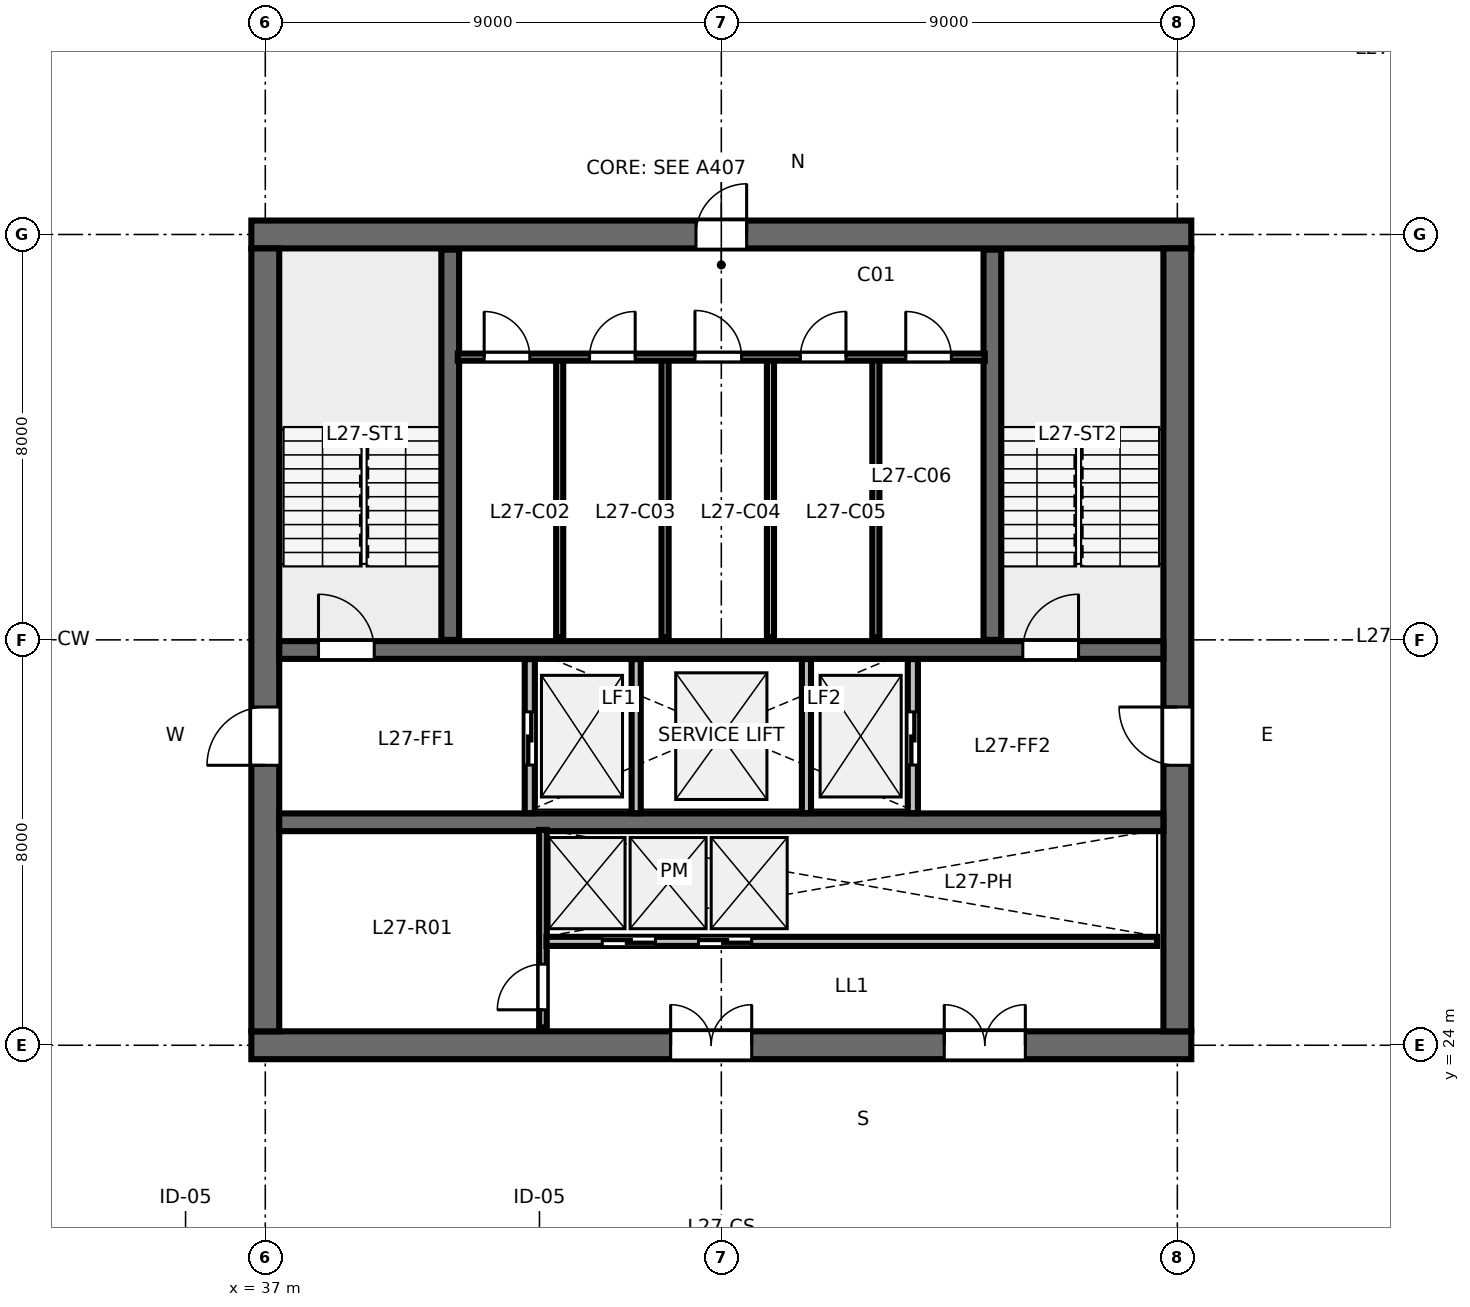
"""IFC4 building model, lengths in metres.
Left out: names, types, materials, properties, quantities, classifications, styles, units other than length and angle.
Written with IfcOpenShell. Run it as: python <this file> out.ifc"""

import sys

from ifc_helpers import new_model, si_unit, direction, frame, frame_2d, origin, place, context, subcontext, project, spatial, rectangle, extrude, element, fill, save


model = new_model("IFC4")
c1 = context("Model", 3, precision=1e-05, world=origin(), true_north=direction((0.0, 1.0)))
c2 = subcontext(c1, "Body", "Model", "MODEL_VIEW")
j1 = project(units=[si_unit("LENGTHUNIT", "METRE"), si_unit("PLANEANGLEUNIT", "RADIAN")], contexts=[c1])
p1 = place(None, origin())
s1 = spatial("IfcSite", under=j1, at=p1, CompositionType="ELEMENT")
p2 = place(p1, origin())
s2 = spatial("IfcBuilding", under=s1, at=p2, CompositionType="ELEMENT")
p3 = place(p2, frame((0.0, 0.0, 106.0)))
s3 = spatial("IfcBuildingStorey", under=s2, at=p3, CompositionType="ELEMENT", Elevation=106.0)
p4 = place(p3, frame((36.725, 24.0, 0.0), z_axis=(0.0, 0.0, 1.0), x_axis=(1.0, 0.0, 0.0)))
e1 = element("IfcWall", 1, at=p4, inside=s3, PredefinedType="SHEAR", context=c2, shape_type="SweptSolid", body=[
    extrude(rectangle(XDim=18.55, YDim=0.55, at=frame_2d((9.275, 0.0))), origin(), (0.0, 0.0, 1.0), 3.36),
])
p5 = place(p4, frame((8.275, 0.0, 0.0)))
e2 = element("IfcOpeningElement", 2, at=p5, cuts=e1, PredefinedType="OPENING", context=c2, shape_type="SweptSolid", body=[
    extrude(rectangle(XDim=1.6, YDim=2.15, at=frame_2d((0.8, 1.075))), frame((0.0, 0.285, 0.0), z_axis=(0.0, -1.0, 0.0), x_axis=(1.0, 0.0, 0.0)), (0.0, 0.0, 1.0), 0.57),
])
p6 = place(p4, frame((13.675, 0.0, 0.0)))
e3 = element("IfcOpeningElement", 3, at=p6, cuts=e1, PredefinedType="OPENING", context=c2, shape_type="SweptSolid", body=[
    extrude(rectangle(XDim=1.6, YDim=2.15, at=frame_2d((0.8, 1.075))), frame((0.0, 0.285, 0.0), z_axis=(0.0, -1.0, 0.0), x_axis=(1.0, 0.0, 0.0)), (0.0, 0.0, 1.0), 0.57),
])
p7 = place(p3, frame((36.725, 40.0, 0.0), z_axis=(0.0, 0.0, 1.0), x_axis=(1.0, 0.0, 0.0)))
e4 = element("IfcWall", 4, at=p7, inside=s3, PredefinedType="SHEAR", context=c2, shape_type="SweptSolid", body=[
    extrude(rectangle(XDim=18.55, YDim=0.55, at=frame_2d((9.275, 0.0))), origin(), (0.0, 0.0, 1.0), 3.36),
])
p8 = place(p7, frame((8.775, 0.0, 0.0)))
e5 = element("IfcOpeningElement", 5, at=p8, cuts=e4, PredefinedType="OPENING", context=c2, shape_type="SweptSolid", body=[
    extrude(rectangle(XDim=1.0, YDim=2.15, at=frame_2d((0.5, 1.075))), frame((0.0, 0.285, 0.0), z_axis=(0.0, -1.0, 0.0), x_axis=(1.0, 0.0, 0.0)), (0.0, 0.0, 1.0), 0.57),
])
p9 = place(p3, frame((37.0, 24.275, 0.0), z_axis=(0.0, 0.0, 1.0), x_axis=(0.0, 1.0, 0.0)))
e6 = element("IfcWall", 6, at=p9, inside=s3, PredefinedType="SHEAR", context=c2, shape_type="SweptSolid", body=[
    extrude(rectangle(XDim=15.45, YDim=0.55, at=frame_2d((7.725, 0.0))), origin(), (0.0, 0.0, 1.0), 3.36),
])
p10 = place(p9, frame((5.25, 0.0, 0.0)))
e7 = element("IfcOpeningElement", 7, at=p10, cuts=e6, PredefinedType="OPENING", context=c2, shape_type="SweptSolid", body=[
    extrude(rectangle(XDim=1.15, YDim=2.15, at=frame_2d((0.575, 1.075))), frame((0.0, 0.285, 0.0), z_axis=(0.0, -1.0, 0.0), x_axis=(1.0, 0.0, 0.0)), (0.0, 0.0, 1.0), 0.57),
])
p11 = place(p3, frame((55.0, 24.275, 0.0), z_axis=(0.0, 0.0, 1.0), x_axis=(0.0, 1.0, 0.0)))
e8 = element("IfcWall", 8, at=p11, inside=s3, PredefinedType="SHEAR", context=c2, shape_type="SweptSolid", body=[
    extrude(rectangle(XDim=15.45, YDim=0.55, at=frame_2d((7.725, 0.0))), origin(), (0.0, 0.0, 1.0), 3.36),
])
p12 = place(p11, frame((5.25, 0.0, 0.0)))
e9 = element("IfcOpeningElement", 9, at=p12, cuts=e8, PredefinedType="OPENING", context=c2, shape_type="SweptSolid", body=[
    extrude(rectangle(XDim=1.15, YDim=2.15, at=frame_2d((0.575, 1.075))), frame((0.0, 0.285, 0.0), z_axis=(0.0, -1.0, 0.0), x_axis=(1.0, 0.0, 0.0)), (0.0, 0.0, 1.0), 0.57),
])
p13 = place(p3, frame((37.275, 31.8, 0.0), z_axis=(0.0, 0.0, 1.0), x_axis=(1.0, 0.0, 0.0)))
e10 = element("IfcWall", 10, at=p13, inside=s3, PredefinedType="SHEAR", context=c2, shape_type="SweptSolid", body=[
    extrude(rectangle(XDim=17.45, YDim=0.35, at=frame_2d((8.725, 0.0))), origin(), (0.0, 0.0, 1.0), 3.36),
])
p14 = place(p13, frame((0.775, 0.0, 0.0)))
e11 = element("IfcOpeningElement", 11, at=p14, cuts=e10, PredefinedType="OPENING", context=c2, shape_type="SweptSolid", body=[
    extrude(rectangle(XDim=1.1, YDim=2.15, at=frame_2d((0.55, 1.075))), frame((0.0, 0.185, 0.0), z_axis=(0.0, -1.0, 0.0), x_axis=(1.0, 0.0, 0.0)), (0.0, 0.0, 1.0), 0.37),
])
p15 = place(p13, frame((14.675, 0.0, 0.0)))
e12 = element("IfcOpeningElement", 12, at=p15, cuts=e10, PredefinedType="OPENING", context=c2, shape_type="SweptSolid", body=[
    extrude(rectangle(XDim=1.1, YDim=2.15, at=frame_2d((0.55, 1.075))), frame((0.0, 0.185, 0.0), z_axis=(0.0, -1.0, 0.0), x_axis=(1.0, 0.0, 0.0)), (0.0, 0.0, 1.0), 0.37),
])
p16 = place(p3, frame((37.275, 28.4, 0.0), z_axis=(0.0, 0.0, 1.0), x_axis=(1.0, 0.0, 0.0)))
e13 = element("IfcWall", 13, at=p16, inside=s3, PredefinedType="SHEAR", context=c2, shape_type="SweptSolid", body=[
    extrude(rectangle(XDim=17.45, YDim=0.35, at=frame_2d((8.725, 0.0))), origin(), (0.0, 0.0, 1.0), 3.36),
])
for number, where, z_axis, x_axis in (
    (14, (40.65, 32.0, 0.0), (0.0, 0.0, 1.0), (0.0, 1.0, 0.0)),
    (15, (51.35, 32.0, 0.0), (0.0, 0.0, 1.0), (0.0, 1.0, 0.0)),
):
    element("IfcWall", number, at=place(p3, frame(where, z_axis=z_axis, x_axis=x_axis)), inside=s3, PredefinedType="SHEAR", context=c2, shape_type="SweptSolid", body=[
        extrude(rectangle(XDim=7.7, YDim=0.35, at=frame_2d((3.85, 0.0))), origin(), (0.0, 0.0, 1.0), 3.6),
    ])
for number, where, z_axis, x_axis in (
    (16, (42.81, 32.05, 0.0), (0.0, 0.0, 1.0), (0.0, 1.0, 0.0)),
    (17, (44.89, 32.05, 0.0), (0.0, 0.0, 1.0), (0.0, 1.0, 0.0)),
    (18, (46.97, 32.05, 0.0), (0.0, 0.0, 1.0), (0.0, 1.0, 0.0)),
    (19, (49.05, 32.05, 0.0), (0.0, 0.0, 1.0), (0.0, 1.0, 0.0)),
):
    element("IfcWall", number, at=place(p3, frame(where, z_axis=z_axis, x_axis=x_axis)), inside=s3, PredefinedType="PARTITIONING", context=c2, shape_type="SweptSolid", body=[
        extrude(rectangle(XDim=5.5, YDim=0.14, at=frame_2d((2.75, 0.0))), origin(), (0.0, 0.0, 1.0), 3.36),
    ])
p17 = place(p3, frame((40.8, 37.58, 0.0), z_axis=(0.0, 0.0, 1.0), x_axis=(1.0, 0.0, 0.0)))
e20 = element("IfcWall", 20, at=p17, inside=s3, PredefinedType="PARTITIONING", context=c2, shape_type="SweptSolid", body=[
    extrude(rectangle(XDim=10.4, YDim=0.14, at=frame_2d((5.2, 0.0))), origin(), (0.0, 0.0, 1.0), 3.36),
])
p18 = place(p17, frame((0.52, 0.0, 0.0)))
e21 = element("IfcOpeningElement", 21, at=p18, cuts=e20, PredefinedType="OPENING", context=c2, shape_type="SweptSolid", body=[
    extrude(rectangle(XDim=0.9, YDim=2.15, at=frame_2d((0.45, 1.075))), frame((0.0, 0.08, 0.0), z_axis=(0.0, -1.0, 0.0), x_axis=(1.0, 0.0, 0.0)), (0.0, 0.0, 1.0), 0.16),
])
p19 = place(p17, frame((2.6, 0.0, 0.0)))
e22 = element("IfcOpeningElement", 22, at=p19, cuts=e20, PredefinedType="OPENING", context=c2, shape_type="SweptSolid", body=[
    extrude(rectangle(XDim=0.9, YDim=2.15, at=frame_2d((0.45, 1.075))), frame((0.0, 0.08, 0.0), z_axis=(0.0, -1.0, 0.0), x_axis=(1.0, 0.0, 0.0)), (0.0, 0.0, 1.0), 0.16),
])
p20 = place(p17, frame((4.68, 0.0, 0.0)))
e23 = element("IfcOpeningElement", 23, at=p20, cuts=e20, PredefinedType="OPENING", context=c2, shape_type="SweptSolid", body=[
    extrude(rectangle(XDim=0.92, YDim=2.15, at=frame_2d((0.46, 1.075))), frame((0.0, 0.08, 0.0), z_axis=(0.0, -1.0, 0.0), x_axis=(1.0, 0.0, 0.0)), (0.0, 0.0, 1.0), 0.16),
])
p21 = place(p17, frame((6.76, 0.0, 0.0)))
e24 = element("IfcOpeningElement", 24, at=p21, cuts=e20, PredefinedType="OPENING", context=c2, shape_type="SweptSolid", body=[
    extrude(rectangle(XDim=0.9, YDim=2.15, at=frame_2d((0.45, 1.075))), frame((0.0, 0.08, 0.0), z_axis=(0.0, -1.0, 0.0), x_axis=(1.0, 0.0, 0.0)), (0.0, 0.0, 1.0), 0.16),
])
p22 = place(p17, frame((8.84, 0.0, 0.0)))
e25 = element("IfcOpeningElement", 25, at=p22, cuts=e20, PredefinedType="OPENING", context=c2, shape_type="SweptSolid", body=[
    extrude(rectangle(XDim=0.9, YDim=2.15, at=frame_2d((0.45, 1.075))), frame((0.0, 0.08, 0.0), z_axis=(0.0, -1.0, 0.0), x_axis=(1.0, 0.0, 0.0)), (0.0, 0.0, 1.0), 0.16),
])
p23 = place(p3, frame((42.22, 28.58, 0.0), z_axis=(0.0, 0.0, 1.0), x_axis=(0.0, 1.0, 0.0)))
e26 = element("IfcWall", 26, at=p23, inside=s3, PredefinedType="PARTITIONING", context=c2, shape_type="SweptSolid", body=[
    extrude(rectangle(XDim=3.04, YDim=0.2, at=frame_2d((1.52, 0.0))), origin(), (0.0, 0.0, 1.0), 3.36),
])
p24 = place(p23, frame((0.95, 0.0, 0.0)))
e27 = element("IfcOpeningElement", 27, at=p24, cuts=e26, PredefinedType="OPENING", context=c2, shape_type="SweptSolid", body=[
    extrude(rectangle(XDim=1.05, YDim=2.15, at=frame_2d((0.525, 1.075))), frame((0.0, 0.11, 0.0), z_axis=(0.0, -1.0, 0.0), x_axis=(1.0, 0.0, 0.0)), (0.0, 0.0, 1.0), 0.22),
])
p25 = place(p3, frame((49.78, 28.58, 0.0), z_axis=(0.0, 0.0, 1.0), x_axis=(0.0, 1.0, 0.0)))
e28 = element("IfcWall", 28, at=p25, inside=s3, PredefinedType="PARTITIONING", context=c2, shape_type="SweptSolid", body=[
    extrude(rectangle(XDim=3.04, YDim=0.2, at=frame_2d((1.52, 0.0))), origin(), (0.0, 0.0, 1.0), 3.36),
])
p26 = place(p25, frame((0.95, 0.0, 0.0)))
e29 = element("IfcOpeningElement", 29, at=p26, cuts=e28, PredefinedType="OPENING", context=c2, shape_type="SweptSolid", body=[
    extrude(rectangle(XDim=1.05, YDim=2.15, at=frame_2d((0.525, 1.075))), frame((0.0, 0.11, 0.0), z_axis=(0.0, -1.0, 0.0), x_axis=(1.0, 0.0, 0.0)), (0.0, 0.0, 1.0), 0.22),
])
for number, where, z_axis, x_axis in (
    (30, (44.32, 28.58, 0.0), (0.0, 0.0, 1.0), (0.0, 1.0, 0.0)),
    (31, (47.68, 28.58, 0.0), (0.0, 0.0, 1.0), (0.0, 1.0, 0.0)),
):
    element("IfcWall", number, at=place(p3, frame(where, z_axis=z_axis, x_axis=x_axis)), inside=s3, PredefinedType="PARTITIONING", context=c2, shape_type="SweptSolid", body=[
        extrude(rectangle(XDim=3.04, YDim=0.18, at=frame_2d((1.52, 0.0))), origin(), (0.0, 0.0, 1.0), 3.36),
    ])
p27 = place(p3, frame((42.48, 24.35, 0.0), z_axis=(0.0, 0.0, 1.0), x_axis=(0.0, 1.0, 0.0)))
e32 = element("IfcWall", 32, at=p27, inside=s3, PredefinedType="PARTITIONING", context=c2, shape_type="SweptSolid", body=[
    extrude(rectangle(XDim=3.9, YDim=0.15, at=frame_2d((1.95, 0.0))), origin(), (0.0, 0.0, 1.0), 3.36),
])
p28 = place(p27, frame((0.35, 0.0, 0.0)))
e33 = element("IfcOpeningElement", 33, at=p28, cuts=e32, PredefinedType="OPENING", context=c2, shape_type="SweptSolid", body=[
    extrude(rectangle(XDim=0.9, YDim=2.15, at=frame_2d((0.45, 1.075))), frame((0.0, 0.085, 0.0), z_axis=(0.0, -1.0, 0.0), x_axis=(1.0, 0.0, 0.0)), (0.0, 0.0, 1.0), 0.17),
])
p29 = place(p3, frame((42.55, 26.05, 0.0), z_axis=(0.0, 0.0, 1.0), x_axis=(1.0, 0.0, 0.0)))
e34 = element("IfcWall", 34, at=p29, inside=s3, PredefinedType="PARTITIONING", context=c2, shape_type="SweptSolid", body=[
    extrude(rectangle(XDim=12.05, YDim=0.18, at=frame_2d((6.025, 0.0))), origin(), (0.0, 0.0, 1.0), 3.36),
])
p30 = place(p29, frame((1.1, 0.0, 0.0)))
e35 = element("IfcOpeningElement", 35, at=p30, cuts=e34, PredefinedType="OPENING", context=c2, shape_type="SweptSolid", body=[
    extrude(rectangle(XDim=1.05, YDim=2.15, at=frame_2d((0.525, 1.075))), frame((0.0, 0.1, 0.0), z_axis=(0.0, -1.0, 0.0), x_axis=(1.0, 0.0, 0.0)), (0.0, 0.0, 1.0), 0.2),
])
p31 = place(p29, frame((3.0, 0.0, 0.0)))
e36 = element("IfcOpeningElement", 36, at=p31, cuts=e34, PredefinedType="OPENING", context=c2, shape_type="SweptSolid", body=[
    extrude(rectangle(XDim=1.05, YDim=2.15, at=frame_2d((0.525, 1.075))), frame((0.0, 0.1, 0.0), z_axis=(0.0, -1.0, 0.0), x_axis=(1.0, 0.0, 0.0)), (0.0, 0.0, 1.0), 0.2),
])
p32 = place(p14, origin())
e37 = element("IfcDoor", 37, at=p32, inside=s3, OperationType="SINGLE_SWING_LEFT", PredefinedType="DOOR", context=c2, shape_type="SweptSolid", body=[
    extrude(rectangle(XDim=1.1, YDim=2.15, at=frame_2d((0.55, 1.075))), frame((0.0, 0.025, 0.0), z_axis=(0.0, -1.0, 0.0), x_axis=(1.0, 0.0, 0.0)), (0.0, 0.0, 1.0), 0.05),
])
fill(e11, e37)
p33 = place(p15, origin())
e38 = element("IfcDoor", 38, at=p33, inside=s3, OperationType="SINGLE_SWING_RIGHT", PredefinedType="DOOR", context=c2, shape_type="SweptSolid", body=[
    extrude(rectangle(XDim=1.1, YDim=2.15, at=frame_2d((0.55, 1.075))), frame((0.0, 0.025, 0.0), z_axis=(0.0, -1.0, 0.0), x_axis=(1.0, 0.0, 0.0)), (0.0, 0.0, 1.0), 0.05),
])
fill(e12, e38)
p34 = place(p8, origin())
e39 = element("IfcDoor", 39, at=p34, inside=s3, OperationType="SINGLE_SWING_RIGHT", PredefinedType="DOOR", context=c2, shape_type="SweptSolid", body=[
    extrude(rectangle(XDim=1.0, YDim=2.15, at=frame_2d((0.5, 1.075))), frame((0.0, 0.025, 0.0), z_axis=(0.0, -1.0, 0.0), x_axis=(1.0, 0.0, 0.0)), (0.0, 0.0, 1.0), 0.05),
])
fill(e5, e39)
p35 = place(p10, origin())
e40 = element("IfcDoor", 40, at=p35, inside=s3, OperationType="SINGLE_SWING_LEFT", PredefinedType="DOOR", context=c2, shape_type="SweptSolid", body=[
    extrude(rectangle(XDim=1.15, YDim=2.15, at=frame_2d((0.575, 1.075))), frame((0.0, 0.025, 0.0), z_axis=(0.0, -1.0, 0.0), x_axis=(1.0, 0.0, 0.0)), (0.0, 0.0, 1.0), 0.05),
])
fill(e7, e40)
p36 = place(p12, origin())
e41 = element("IfcDoor", 41, at=p36, inside=s3, OperationType="SINGLE_SWING_RIGHT", PredefinedType="DOOR", context=c2, shape_type="SweptSolid", body=[
    extrude(rectangle(XDim=1.15, YDim=2.15, at=frame_2d((0.575, 1.075))), frame((0.0, 0.025, 0.0), z_axis=(0.0, -1.0, 0.0), x_axis=(1.0, 0.0, 0.0)), (0.0, 0.0, 1.0), 0.05),
])
fill(e9, e41)
p37 = place(p5, origin())
e42 = element("IfcDoor", 42, at=p37, inside=s3, OperationType="DOUBLE_DOOR_SINGLE_SWING", PredefinedType="DOOR", context=c2, shape_type="SweptSolid", body=[
    extrude(rectangle(XDim=1.6, YDim=2.15, at=frame_2d((0.8, 1.075))), frame((0.0, 0.025, 0.0), z_axis=(0.0, -1.0, 0.0), x_axis=(1.0, 0.0, 0.0)), (0.0, 0.0, 1.0), 0.05),
])
fill(e2, e42)
p38 = place(p6, origin())
e43 = element("IfcDoor", 43, at=p38, inside=s3, OperationType="DOUBLE_DOOR_SINGLE_SWING", PredefinedType="DOOR", context=c2, shape_type="SweptSolid", body=[
    extrude(rectangle(XDim=1.6, YDim=2.15, at=frame_2d((0.8, 1.075))), frame((0.0, 0.025, 0.0), z_axis=(0.0, -1.0, 0.0), x_axis=(1.0, 0.0, 0.0)), (0.0, 0.0, 1.0), 0.05),
])
fill(e3, e43)
p39 = place(p18, origin())
e44 = element("IfcDoor", 44, at=p39, inside=s3, OperationType="SINGLE_SWING_LEFT", PredefinedType="DOOR", context=c2, shape_type="SweptSolid", body=[
    extrude(rectangle(XDim=0.9, YDim=2.15, at=frame_2d((0.45, 1.075))), frame((0.0, 0.025, 0.0), z_axis=(0.0, -1.0, 0.0), x_axis=(1.0, 0.0, 0.0)), (0.0, 0.0, 1.0), 0.05),
])
fill(e21, e44)
p40 = place(p19, origin())
e45 = element("IfcDoor", 45, at=p40, inside=s3, OperationType="SINGLE_SWING_RIGHT", PredefinedType="DOOR", context=c2, shape_type="SweptSolid", body=[
    extrude(rectangle(XDim=0.9, YDim=2.15, at=frame_2d((0.45, 1.075))), frame((0.0, 0.025, 0.0), z_axis=(0.0, -1.0, 0.0), x_axis=(1.0, 0.0, 0.0)), (0.0, 0.0, 1.0), 0.05),
])
fill(e22, e45)
p41 = place(p20, origin())
e46 = element("IfcDoor", 46, at=p41, inside=s3, OperationType="SINGLE_SWING_LEFT", PredefinedType="DOOR", context=c2, shape_type="SweptSolid", body=[
    extrude(rectangle(XDim=0.92, YDim=2.15, at=frame_2d((0.46, 1.075))), frame((0.0, 0.025, 0.0), z_axis=(0.0, -1.0, 0.0), x_axis=(1.0, 0.0, 0.0)), (0.0, 0.0, 1.0), 0.05),
])
fill(e23, e46)
p42 = place(p21, origin())
e47 = element("IfcDoor", 47, at=p42, inside=s3, OperationType="SINGLE_SWING_RIGHT", PredefinedType="DOOR", context=c2, shape_type="SweptSolid", body=[
    extrude(rectangle(XDim=0.9, YDim=2.15, at=frame_2d((0.45, 1.075))), frame((0.0, 0.025, 0.0), z_axis=(0.0, -1.0, 0.0), x_axis=(1.0, 0.0, 0.0)), (0.0, 0.0, 1.0), 0.05),
])
fill(e24, e47)
p43 = place(p22, origin())
e48 = element("IfcDoor", 48, at=p43, inside=s3, OperationType="SINGLE_SWING_LEFT", PredefinedType="DOOR", context=c2, shape_type="SweptSolid", body=[
    extrude(rectangle(XDim=0.9, YDim=2.15, at=frame_2d((0.45, 1.075))), frame((0.0, 0.025, 0.0), z_axis=(0.0, -1.0, 0.0), x_axis=(1.0, 0.0, 0.0)), (0.0, 0.0, 1.0), 0.05),
])
fill(e25, e48)
p44 = place(p24, origin())
e49 = element("IfcDoor", 49, at=p44, inside=s3, OperationType="SLIDING_TO_LEFT", PredefinedType="DOOR", context=c2, shape_type="SweptSolid", body=[
    extrude(rectangle(XDim=1.05, YDim=2.15, at=frame_2d((0.525, 1.075))), frame((0.0, 0.025, 0.0), z_axis=(0.0, -1.0, 0.0), x_axis=(1.0, 0.0, 0.0)), (0.0, 0.0, 1.0), 0.05),
])
fill(e27, e49)
p45 = place(p26, origin())
e50 = element("IfcDoor", 50, at=p45, inside=s3, OperationType="SLIDING_TO_RIGHT", PredefinedType="DOOR", context=c2, shape_type="SweptSolid", body=[
    extrude(rectangle(XDim=1.05, YDim=2.15, at=frame_2d((0.525, 1.075))), frame((0.0, 0.025, 0.0), z_axis=(0.0, -1.0, 0.0), x_axis=(1.0, 0.0, 0.0)), (0.0, 0.0, 1.0), 0.05),
])
fill(e29, e50)
p46 = place(p28, origin())
e51 = element("IfcDoor", 51, at=p46, inside=s3, OperationType="SINGLE_SWING_LEFT", PredefinedType="DOOR", context=c2, shape_type="SweptSolid", body=[
    extrude(rectangle(XDim=0.9, YDim=2.15, at=frame_2d((0.45, 1.075))), frame((0.0, 0.025, 0.0), z_axis=(0.0, -1.0, 0.0), x_axis=(1.0, 0.0, 0.0)), (0.0, 0.0, 1.0), 0.05),
])
fill(e33, e51)
p47 = place(p30, origin())
e52 = element("IfcDoor", 52, at=p47, inside=s3, OperationType="SLIDING_TO_LEFT", PredefinedType="DOOR", context=c2, shape_type="SweptSolid", body=[
    extrude(rectangle(XDim=1.05, YDim=2.15, at=frame_2d((0.525, 1.075))), frame((0.0, 0.025, 0.0), z_axis=(0.0, -1.0, 0.0), x_axis=(1.0, 0.0, 0.0)), (0.0, 0.0, 1.0), 0.05),
])
fill(e35, e52)
p48 = place(p31, origin())
e53 = element("IfcDoor", 53, at=p48, inside=s3, OperationType="SLIDING_TO_RIGHT", PredefinedType="DOOR", context=c2, shape_type="SweptSolid", body=[
    extrude(rectangle(XDim=1.05, YDim=2.15, at=frame_2d((0.525, 1.075))), frame((0.0, 0.025, 0.0), z_axis=(0.0, -1.0, 0.0), x_axis=(1.0, 0.0, 0.0)), (0.0, 0.0, 1.0), 0.05),
])
fill(e36, e53)
save(model, sys.argv[1])
